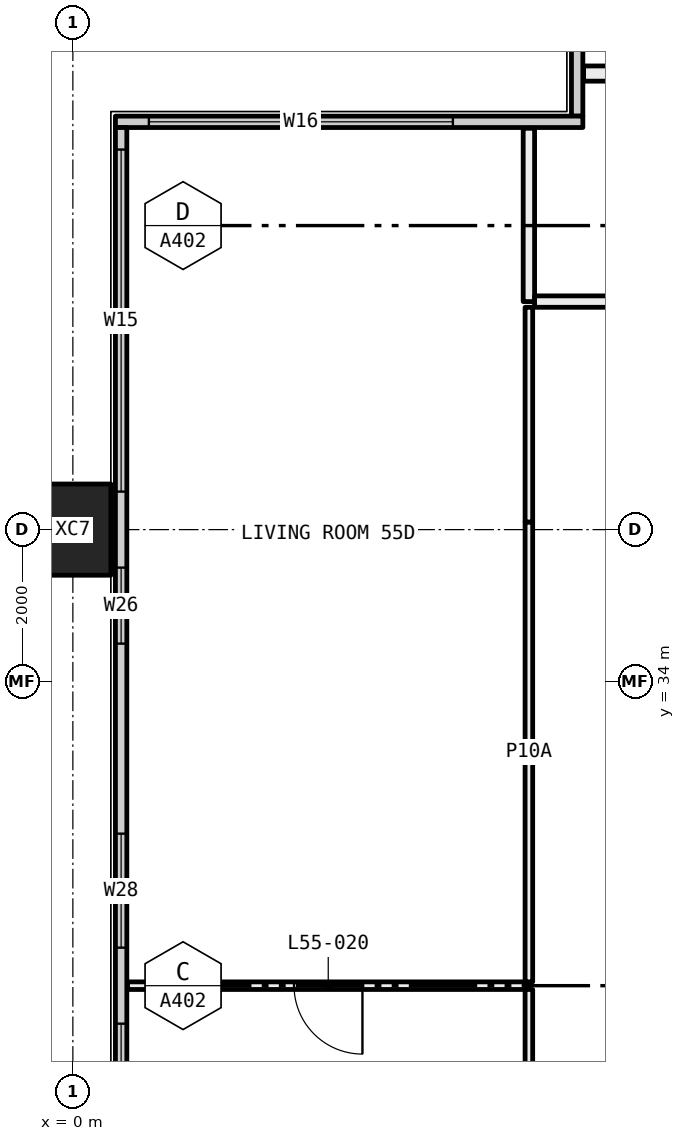
"""IFC4 building model, lengths in metres.
Left out: names, types, materials, properties, quantities, classifications, styles, units other than length and angle.
Written with IfcOpenShell. Run it as: python <this file> out.ifc"""

import sys

from ifc_helpers import new_model, si_unit, direction, frame, frame_2d, origin, origin_2d, place, context, subcontext, project, spatial, rectangle, hollow_rectangle, extrude, element, fill, save


model = new_model("IFC4")
c1 = context("Model", 3, precision=1e-05, world=origin(), true_north=direction((0.0, 1.0)))
c2 = subcontext(c1, "Body", "Model", "MODEL_VIEW")
j1 = project(units=[si_unit("LENGTHUNIT", "METRE"), si_unit("PLANEANGLEUNIT", "RADIAN")], contexts=[c1])
p1 = place(None, origin())
s1 = spatial("IfcSite", under=j1, at=p1, CompositionType="ELEMENT")
p2 = place(p1, origin())
s2 = spatial("IfcBuilding", under=s1, at=p2, CompositionType="ELEMENT")
p3 = place(p2, frame((0.0, 0.0, 206.55)))
s3 = spatial("IfcBuildingStorey", under=s2, at=p3, CompositionType="ELEMENT", Elevation=206.55)
p4 = place(p3, frame((0.0, 36.0, -0.4), z_axis=(0.0, 0.0, 1.0), x_axis=(0.0, 1.0, 0.0)))
e1 = element("IfcColumn", 1, at=p4, inside=s3, PredefinedType="COLUMN", context=c2, shape_type="SweptSolid", body=[
    extrude(hollow_rectangle(XDim=1.2, YDim=1.0, WallThickness=0.045, at=origin_2d()), origin(), (0.0, 0.0, 1.0), 3.45),
])
p5 = place(p3, frame((6.635, 41.44, 0.0), z_axis=(0.0, 0.0, 1.0), x_axis=(0.0, 1.0, 0.0)))
e2 = element("IfcWall", 2, at=p5, inside=s3, PredefinedType="ELEMENTEDWALL", context=c2, shape_type="SweptSolid", body=[
    extrude(rectangle(XDim=5.85, YDim=0.15, at=frame_2d((2.925, 0.0))), origin(), (0.0, 0.0, 1.0), 3.05),
])
p6 = place(p5, frame((1.56, 0.0, 0.45)))
e3 = element("IfcOpeningElement", 3, at=p6, cuts=e2, PredefinedType="OPENING", context=c2, shape_type="SweptSolid", body=[
    extrude(rectangle(XDim=4.0, YDim=2.55, at=frame_2d((2.0, 1.275))), frame((0.0, 0.085, 0.0), z_axis=(0.0, -1.0, 0.0), x_axis=(1.0, 0.0, 0.0)), (0.0, 0.0, 1.0), 0.17),
])
p7 = place(p3, frame((0.56, 41.365, 0.0), z_axis=(0.0, 0.0, 1.0), x_axis=(1.0, 0.0, 0.0)))
e4 = element("IfcWall", 4, at=p7, inside=s3, PredefinedType="ELEMENTEDWALL", context=c2, shape_type="SweptSolid", body=[
    extrude(rectangle(XDim=6.15, YDim=0.15, at=frame_2d((3.075, 0.0))), origin(), (0.0, 0.0, 1.0), 3.05),
])
p8 = place(p7, frame((0.44, 0.0, 0.45)))
e5 = element("IfcOpeningElement", 5, at=p8, cuts=e4, PredefinedType="OPENING", context=c2, shape_type="SweptSolid", body=[
    extrude(rectangle(XDim=4.0, YDim=2.55, at=frame_2d((2.0, 1.275))), frame((0.0, 0.085, 0.0), z_axis=(0.0, -1.0, 0.0), x_axis=(1.0, 0.0, 0.0)), (0.0, 0.0, 1.0), 0.17),
])
p9 = place(p3, frame((0.635, 18.71, 0.0), z_axis=(0.0, 0.0, 1.0), x_axis=(0.0, 1.0, 0.0)))
e6 = element("IfcWall", 6, at=p9, inside=s3, PredefinedType="ELEMENTEDWALL", context=c2, shape_type="SweptSolid", body=[
    extrude(rectangle(XDim=22.58, YDim=0.15, at=frame_2d((11.29, 0.0))), origin(), (0.0, 0.0, 1.0), 3.05),
])
p10 = place(p9, frame((0.29, 0.0, 0.45)))
e7 = element("IfcOpeningElement", 7, at=p10, cuts=e6, PredefinedType="OPENING", context=c2, shape_type="SweptSolid", body=[
    extrude(rectangle(XDim=4.5, YDim=2.55, at=frame_2d((2.25, 1.275))), frame((0.0, 0.085, 0.0), z_axis=(0.0, -1.0, 0.0), x_axis=(1.0, 0.0, 0.0)), (0.0, 0.0, 1.0), 0.17),
])
p11 = place(p9, frame((5.79, 0.0, 0.45)))
e8 = element("IfcOpeningElement", 8, at=p11, cuts=e6, PredefinedType="OPENING", context=c2, shape_type="SweptSolid", body=[
    extrude(rectangle(XDim=1.0, YDim=2.55, at=frame_2d((0.5, 1.275))), frame((0.0, 0.085, 0.0), z_axis=(0.0, -1.0, 0.0), x_axis=(1.0, 0.0, 0.0)), (0.0, 0.0, 1.0), 0.17),
])
p12 = place(p9, frame((9.29, 0.0, 0.45)))
e9 = element("IfcOpeningElement", 9, at=p12, cuts=e6, PredefinedType="OPENING", context=c2, shape_type="SweptSolid", body=[
    extrude(rectangle(XDim=1.5, YDim=2.55, at=frame_2d((0.75, 1.275))), frame((0.0, 0.085, 0.0), z_axis=(0.0, -1.0, 0.0), x_axis=(1.0, 0.0, 0.0)), (0.0, 0.0, 1.0), 0.17),
])
p13 = place(p9, frame((11.79, 0.0, 0.45)))
e10 = element("IfcOpeningElement", 10, at=p13, cuts=e6, PredefinedType="OPENING", context=c2, shape_type="SweptSolid", body=[
    extrude(rectangle(XDim=1.5, YDim=2.55, at=frame_2d((0.75, 1.275))), frame((0.0, 0.085, 0.0), z_axis=(0.0, -1.0, 0.0), x_axis=(1.0, 0.0, 0.0)), (0.0, 0.0, 1.0), 0.17),
])
p14 = place(p9, frame((15.79, 0.0, 0.45)))
e11 = element("IfcOpeningElement", 11, at=p14, cuts=e6, PredefinedType="OPENING", context=c2, shape_type="SweptSolid", body=[
    extrude(rectangle(XDim=1.0, YDim=2.55, at=frame_2d((0.5, 1.275))), frame((0.0, 0.085, 0.0), z_axis=(0.0, -1.0, 0.0), x_axis=(1.0, 0.0, 0.0)), (0.0, 0.0, 1.0), 0.17),
])
p15 = place(p9, frame((17.79, 0.0, 0.45)))
e12 = element("IfcOpeningElement", 12, at=p15, cuts=e6, PredefinedType="OPENING", context=c2, shape_type="SweptSolid", body=[
    extrude(rectangle(XDim=4.5, YDim=2.55, at=frame_2d((2.25, 1.275))), frame((0.0, 0.085, 0.0), z_axis=(0.0, -1.0, 0.0), x_axis=(1.0, 0.0, 0.0)), (0.0, 0.0, 1.0), 0.17),
])
p16 = place(p3, frame((6.72, 42.0, 0.0), z_axis=(0.0, 0.0, 1.0), x_axis=(1.0, 0.0, 0.0)))
e13 = element("IfcWall", 13, at=p16, inside=s3, PredefinedType="PARTITIONING", context=c2, shape_type="SweptSolid", body=[
    extrude(rectangle(XDim=3.38, YDim=0.2, at=frame_2d((1.69, 0.0))), origin(), (0.0, 0.0, 1.0), 3.05),
])
p17 = place(p3, frame((6.0, 30.0, 0.0), z_axis=(0.0, 0.0, 1.0), x_axis=(-1.0, 0.0, 0.0)))
e14 = element("IfcWall", 14, at=p17, inside=s3, PredefinedType="PARTITIONING", context=c2, shape_type="SweptSolid", body=[
    extrude(rectangle(XDim=5.28, YDim=0.1, at=frame_2d((2.64, 0.0))), origin(), (0.0, 0.0, 1.0), 3.05),
])
p18 = place(p17, frame((2.19, 0.0, 0.0)))
e15 = element("IfcOpeningElement", 15, at=p18, cuts=e14, PredefinedType="OPENING", context=c2, shape_type="SweptSolid", body=[
    extrude(rectangle(XDim=0.9, YDim=2.1, at=frame_2d((0.45, 1.05))), frame((0.0, 0.06, 0.0), z_axis=(0.0, -1.0, 0.0), x_axis=(1.0, 0.0, 0.0)), (0.0, 0.0, 1.0), 0.12),
])
p19 = place(p3, frame((6.0, 25.5, 0.0), z_axis=(0.0, 0.0, 1.0), x_axis=(0.0, 1.0, 0.0)))
e16 = element("IfcWall", 16, at=p19, inside=s3, PredefinedType="PARTITIONING", context=c2, shape_type="SweptSolid", body=[
    extrude(rectangle(XDim=4.45, YDim=0.1, at=frame_2d((2.225, 0.0))), origin(), (0.0, 0.0, 1.0), 3.05),
])
p20 = place(p3, frame((6.0, 30.05, 0.0), z_axis=(0.0, 0.0, 1.0), x_axis=(0.0, 1.0, 0.0)))
e17 = element("IfcWall", 17, at=p20, inside=s3, PredefinedType="PARTITIONING", context=c2, shape_type="SweptSolid", body=[
    extrude(rectangle(XDim=6.05, YDim=0.1, at=frame_2d((3.025, 0.0))), origin(), (0.0, 0.0, 1.0), 2.45),
])
p21 = place(p3, frame((6.0, 36.1, 0.0), z_axis=(0.0, 0.0, 1.0), x_axis=(0.0, 1.0, 0.0)))
e18 = element("IfcWall", 18, at=p21, inside=s3, PredefinedType="PARTITIONING", context=c2, shape_type="SweptSolid", body=[
    extrude(rectangle(XDim=2.825, YDim=0.1, at=frame_2d((1.413, 0.0))), origin(), (0.0, 0.0, 1.0), 3.05),
])
p22 = place(p3, frame((6.0, 39.0, 0.0), z_axis=(0.0, 0.0, 1.0), x_axis=(0.0, 1.0, 0.0)))
e19 = element("IfcWall", 19, at=p22, inside=s3, PredefinedType="PARTITIONING", context=c2, shape_type="SweptSolid", body=[
    extrude(rectangle(XDim=2.28, YDim=0.15, at=frame_2d((1.14, 0.0))), origin(), (0.0, 0.0, 1.0), 3.05),
])
p23 = place(p3, frame((10.0, 39.0, 0.0), z_axis=(0.0, 0.0, 1.0), x_axis=(-1.0, 0.0, 0.0)))
e20 = element("IfcWall", 20, at=p23, inside=s3, PredefinedType="PARTITIONING", context=c2, shape_type="SweptSolid", body=[
    extrude(rectangle(XDim=3.925, YDim=0.15, at=frame_2d((1.962, 0.0))), origin(), (0.0, 0.0, 1.0), 3.05),
])
p24 = place(p23, frame((1.512, 0.0, 0.0)))
e21 = element("IfcOpeningElement", 21, at=p24, cuts=e20, PredefinedType="OPENING", context=c2, shape_type="SweptSolid", body=[
    extrude(rectangle(XDim=0.9, YDim=2.1, at=frame_2d((0.45, 1.05))), frame((0.0, 0.085, 0.0), z_axis=(0.0, -1.0, 0.0), x_axis=(1.0, 0.0, 0.0)), (0.0, 0.0, 1.0), 0.17),
])
p25 = place(p8, origin())
e22 = element("IfcWindow", 22, at=p25, inside=s3, PartitioningType="SINGLE_PANEL", PredefinedType="WINDOW", context=c2, shape_type="SweptSolid", body=[
    extrude(rectangle(XDim=4.0, YDim=2.55, at=frame_2d((2.0, 1.275))), frame((0.0, 0.03, 0.0), z_axis=(0.0, -1.0, 0.0), x_axis=(1.0, 0.0, 0.0)), (0.0, 0.0, 1.0), 0.06),
])
fill(e5, e22)
p26 = place(p12, origin())
e23 = element("IfcWindow", 23, at=p26, inside=s3, PartitioningType="SINGLE_PANEL", PredefinedType="WINDOW", context=c2, shape_type="SweptSolid", body=[
    extrude(rectangle(XDim=1.5, YDim=2.55, at=frame_2d((0.75, 1.275))), frame((0.0, 0.03, 0.0), z_axis=(0.0, -1.0, 0.0), x_axis=(1.0, 0.0, 0.0)), (0.0, 0.0, 1.0), 0.06),
])
fill(e9, e23)
p27 = place(p13, origin())
e24 = element("IfcWindow", 24, at=p27, inside=s3, PartitioningType="SINGLE_PANEL", PredefinedType="WINDOW", context=c2, shape_type="SweptSolid", body=[
    extrude(rectangle(XDim=1.5, YDim=2.55, at=frame_2d((0.75, 1.275))), frame((0.0, 0.03, 0.0), z_axis=(0.0, -1.0, 0.0), x_axis=(1.0, 0.0, 0.0)), (0.0, 0.0, 1.0), 0.06),
])
fill(e10, e24)
p28 = place(p14, origin())
e25 = element("IfcWindow", 25, at=p28, inside=s3, PartitioningType="SINGLE_PANEL", PredefinedType="WINDOW", context=c2, shape_type="SweptSolid", body=[
    extrude(rectangle(XDim=1.0, YDim=2.55, at=frame_2d((0.5, 1.275))), frame((0.0, 0.03, 0.0), z_axis=(0.0, -1.0, 0.0), x_axis=(1.0, 0.0, 0.0)), (0.0, 0.0, 1.0), 0.06),
])
fill(e11, e25)
p29 = place(p15, origin())
e26 = element("IfcWindow", 26, at=p29, inside=s3, PartitioningType="SINGLE_PANEL", PredefinedType="WINDOW", context=c2, shape_type="SweptSolid", body=[
    extrude(rectangle(XDim=4.5, YDim=2.55, at=frame_2d((2.25, 1.275))), frame((0.0, 0.03, 0.0), z_axis=(0.0, -1.0, 0.0), x_axis=(1.0, 0.0, 0.0)), (0.0, 0.0, 1.0), 0.06),
])
fill(e12, e26)
p30 = place(p18, origin())
e27 = element("IfcDoor", 27, at=p30, inside=s3, OperationType="SINGLE_SWING_RIGHT", PredefinedType="DOOR", context=c2, shape_type="SweptSolid", body=[
    extrude(rectangle(XDim=0.9, YDim=2.1, at=frame_2d((0.45, 1.05))), frame((0.0, 0.025, 0.0), z_axis=(0.0, -1.0, 0.0), x_axis=(1.0, 0.0, 0.0)), (0.0, 0.0, 1.0), 0.05),
])
fill(e15, e27)
save(model, sys.argv[1])
